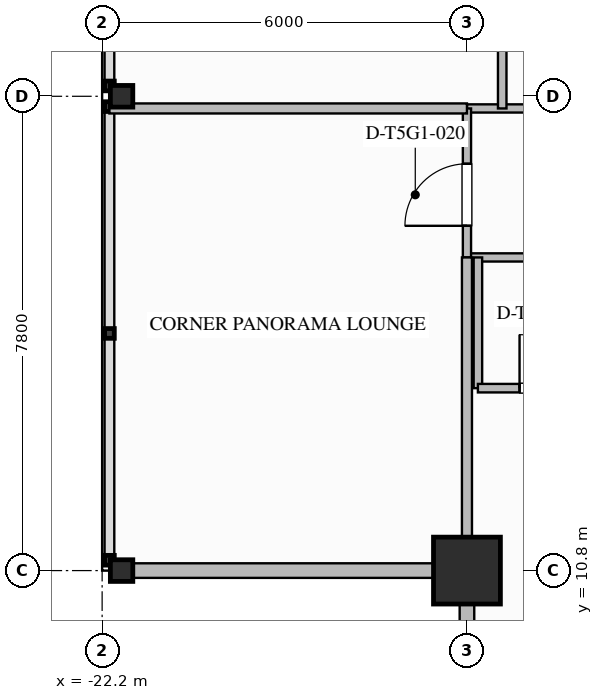
"""IFC4 building model, lengths in metres.
Left out: names, types, materials, properties, quantities, classifications, styles, units other than length and angle.
Written with IfcOpenShell. Run it as: python <this file> out.ifc"""

import sys

from ifc_helpers import new_model, si_unit, direction, frame, frame_2d, origin, origin_2d, place, context, subcontext, project, spatial, rectangle, i_section, extrude, element, fill, save


model = new_model("IFC4")
c1 = context("Model", 3, precision=1e-05, world=origin(), true_north=direction((0.0, 1.0)))
c2 = subcontext(c1, "Body", "Model", "MODEL_VIEW")
j1 = project(units=[si_unit("LENGTHUNIT", "METRE"), si_unit("PLANEANGLEUNIT", "RADIAN")], contexts=[c1])
p1 = place(None, origin())
s1 = spatial("IfcSite", under=j1, at=p1, CompositionType="ELEMENT")
p2 = place(p1, origin())
s2 = spatial("IfcBuilding", under=s1, at=p2, CompositionType="ELEMENT")
p3 = place(p2, frame((0.0, 0.0, 272.3)))
s3 = spatial("IfcBuildingStorey", under=s2, at=p3, CompositionType="ELEMENT", Elevation=272.3)
p4 = place(p3, frame((-16.2, 10.8, 0.0), z_axis=(0.0, 0.0, 1.0), x_axis=(1.0, 0.0, 0.0)))
e1 = element("IfcColumn", 1, at=p4, inside=s3, PredefinedType="COLUMN", context=c2, shape_type="SweptSolid", body=[
    extrude(rectangle(XDim=1.1, YDim=1.1, at=origin_2d()), origin(), (0.0, 0.0, 1.0), 3.65),
])
for number, where, z_axis, x_axis in (
    (2, (-21.88, 10.8, 0.0), (0.0, 0.0, 1.0), (1.0, 0.0, 0.0)),
    (3, (-21.88, 18.6, 0.0), (0.0, 0.0, 1.0), (1.0, 0.0, 0.0)),
):
    element("IfcColumn", number, at=place(p3, frame(where, z_axis=z_axis, x_axis=x_axis)), inside=s3, PredefinedType="COLUMN", context=c2, shape_type="SweptSolid", body=[
        extrude(i_section(OverallWidth=0.369, OverallDepth=0.356, WebThickness=0.011, FlangeThickness=0.018, FilletRadius=0.025, at=origin_2d()), origin(), (0.0, 0.0, 1.0), 3.647),
    ])
for number, where, z_axis, x_axis in (
    (4, (-16.2, 4.92, 0.0), (0.0, 0.0, 1.0), (0.0, 1.0, 0.0)),
    (5, (-16.2, 10.8, 0.0), (0.0, 0.0, 1.0), (-1.0, 0.0, 0.0)),
):
    element("IfcWall", number, at=place(p3, frame(where, z_axis=z_axis, x_axis=x_axis)), inside=s3, PredefinedType="STANDARD", context=c2, shape_type="SweptSolid", body=[
        extrude(rectangle(XDim=5.88, YDim=0.24, at=frame_2d((2.94, 0.0))), origin(), (0.0, 0.0, 1.0), 2.779),
    ])
p5 = place(p3, frame((-16.2, 15.95, 0.0), z_axis=(0.0, 0.0, 1.0), x_axis=(1.0, 0.0, 0.0)))
e6 = element("IfcWall", 6, at=p5, inside=s3, PredefinedType="PARTITIONING", context=c2, shape_type="SweptSolid", body=[
    extrude(rectangle(XDim=38.28, YDim=0.135, at=frame_2d((19.14, 0.0))), origin(), (0.0, 0.0, 1.0), 3.39),
])
p6 = place(p5, frame((35.785, 0.0, 0.0)))
e7 = element("IfcOpeningElement", 7, at=p6, cuts=e6, PredefinedType="OPENING", context=c2, shape_type="SweptSolid", body=[
    extrude(rectangle(XDim=1.26, YDim=2.2, at=frame_2d((0.63, 1.1))), frame((0.0, 0.077, 0.0), z_axis=(0.0, -1.0, 0.0), x_axis=(1.0, 0.0, 0.0)), (0.0, 0.0, 1.0), 0.155),
])
p7 = place(p5, frame((3.285, 0.0, 0.0)))
e8 = element("IfcOpeningElement", 8, at=p7, cuts=e6, PredefinedType="OPENING", context=c2, shape_type="SweptSolid", body=[
    extrude(rectangle(XDim=1.26, YDim=2.2, at=frame_2d((0.63, 1.1))), frame((0.0, 0.077, 0.0), z_axis=(0.0, -1.0, 0.0), x_axis=(1.0, 0.0, 0.0)), (0.0, 0.0, 1.0), 0.155),
])
p8 = place(p5, frame((7.335, 0.0, 0.0)))
e9 = element("IfcOpeningElement", 9, at=p8, cuts=e6, PredefinedType="OPENING", context=c2, shape_type="SweptSolid", body=[
    extrude(rectangle(XDim=1.26, YDim=2.2, at=frame_2d((0.63, 1.1))), frame((0.0, 0.077, 0.0), z_axis=(0.0, -1.0, 0.0), x_axis=(1.0, 0.0, 0.0)), (0.0, 0.0, 1.0), 0.155),
])
p9 = place(p5, frame((15.69, 0.0, 0.0)))
e10 = element("IfcOpeningElement", 10, at=p9, cuts=e6, PredefinedType="OPENING", context=c2, shape_type="SweptSolid", body=[
    extrude(rectangle(XDim=1.02, YDim=2.15, at=frame_2d((0.51, 1.075))), frame((0.0, 0.077, 0.0), z_axis=(0.0, -1.0, 0.0), x_axis=(1.0, 0.0, 0.0)), (0.0, 0.0, 1.0), 0.155),
])
p10 = place(p5, frame((21.375, 0.0, 0.0)))
e11 = element("IfcOpeningElement", 11, at=p10, cuts=e6, PredefinedType="OPENING", context=c2, shape_type="SweptSolid", body=[
    extrude(rectangle(XDim=1.26, YDim=2.2, at=frame_2d((0.63, 1.1))), frame((0.0, 0.077, 0.0), z_axis=(0.0, -1.0, 0.0), x_axis=(1.0, 0.0, 0.0)), (0.0, 0.0, 1.0), 0.155),
])
p11 = place(p5, frame((30.285, 0.0, 0.0)))
e12 = element("IfcOpeningElement", 12, at=p11, cuts=e6, PredefinedType="OPENING", context=c2, shape_type="SweptSolid", body=[
    extrude(rectangle(XDim=1.26, YDim=2.2, at=frame_2d((0.63, 1.1))), frame((0.0, 0.077, 0.0), z_axis=(0.0, -1.0, 0.0), x_axis=(1.0, 0.0, 0.0)), (0.0, 0.0, 1.0), 0.155),
])
p12 = place(p3, frame((-16.2, 18.4, 0.0), z_axis=(0.0, 0.0, 1.0), x_axis=(1.0, 0.0, 0.0)))
e13 = element("IfcWall", 13, at=p12, inside=s3, PredefinedType="PARTITIONING", context=c2, shape_type="SweptSolid", body=[
    extrude(rectangle(XDim=7.6, YDim=0.135, at=frame_2d((3.8, 0.0))), origin(), (0.0, 0.0, 1.0), 2.767),
])
p13 = place(p12, frame((4.585, 0.0, 0.0)))
e14 = element("IfcOpeningElement", 14, at=p13, cuts=e13, PredefinedType="OPENING", context=c2, shape_type="SweptSolid", body=[
    extrude(rectangle(XDim=1.26, YDim=2.2, at=frame_2d((0.63, 1.1))), frame((0.0, 0.077, 0.0), z_axis=(0.0, -1.0, 0.0), x_axis=(1.0, 0.0, 0.0)), (0.0, 0.0, 1.0), 0.155),
])
p14 = place(p3, frame((-16.2, 15.95, 0.0), z_axis=(0.0, 0.0, 1.0), x_axis=(0.0, 1.0, 0.0)))
e15 = element("IfcWall", 15, at=p14, inside=s3, PredefinedType="PARTITIONING", context=c2, shape_type="SweptSolid", body=[
    extrude(rectangle(XDim=2.45, YDim=0.135, at=frame_2d((1.225, 0.0))), origin(), (0.0, 0.0, 1.0), 2.764),
])
p15 = place(p14, frame((0.52, 0.0, 0.0)))
e16 = element("IfcOpeningElement", 16, at=p15, cuts=e15, PredefinedType="OPENING", context=c2, shape_type="SweptSolid", body=[
    extrude(rectangle(XDim=1.02, YDim=2.15, at=frame_2d((0.51, 1.075))), frame((0.0, 0.077, 0.0), z_axis=(0.0, -1.0, 0.0), x_axis=(1.0, 0.0, 0.0)), (0.0, 0.0, 1.0), 0.155),
])
p16 = place(p3, frame((-16.2, 10.92, 0.0), z_axis=(0.0, 0.0, 1.0), x_axis=(0.0, 1.0, 0.0)))
e17 = element("IfcWall", 17, at=p16, inside=s3, PredefinedType="PARTITIONING", context=c2, shape_type="SweptSolid", body=[
    extrude(rectangle(XDim=5.03, YDim=0.165, at=frame_2d((2.515, 0.0))), origin(), (0.0, 0.0, 1.0), 2.764),
])
p17 = place(p3, frame((-22.08, 18.4, 0.0), z_axis=(0.0, 0.0, 1.0), x_axis=(1.0, 0.0, 0.0)))
e18 = element("IfcWall", 18, at=p17, inside=s3, PredefinedType="PARTITIONING", context=c2, shape_type="SweptSolid", body=[
    extrude(rectangle(XDim=5.88, YDim=0.165, at=frame_2d((2.94, 0.0))), origin(), (0.0, 0.0, 1.0), 2.764),
])
p18 = place(p3, frame((-16.02, 15.95, 0.0), z_axis=(0.0, 0.0, 1.0), x_axis=(0.0, -1.0, 0.0)))
e19 = element("IfcWall", 19, at=p18, inside=s3, PredefinedType="PLUMBINGWALL", context=c2, shape_type="SweptSolid", body=[
    extrude(rectangle(XDim=2.15, YDim=0.14, at=frame_2d((1.075, 0.0))), origin(), (0.0, 0.0, 1.0), 2.764),
])
p19 = place(p3, frame((-16.02, 13.8, 0.0), z_axis=(0.0, 0.0, 1.0), x_axis=(1.0, 0.0, 0.0)))
e20 = element("IfcWall", 20, at=p19, inside=s3, PredefinedType="PLUMBINGWALL", context=c2, shape_type="SweptSolid", body=[
    extrude(rectangle(XDim=2.25, YDim=0.14, at=frame_2d((1.125, 0.0))), origin(), (0.0, 0.0, 1.0), 3.39),
])
p20 = place(p19, frame((0.685, 0.0, 0.0)))
e21 = element("IfcOpeningElement", 21, at=p20, cuts=e20, PredefinedType="OPENING", context=c2, shape_type="SweptSolid", body=[
    extrude(rectangle(XDim=0.88, YDim=2.1, at=frame_2d((0.44, 1.05))), frame((0.0, 0.08, 0.0), z_axis=(0.0, -1.0, 0.0), x_axis=(1.0, 0.0, 0.0)), (0.0, 0.0, 1.0), 0.16),
])
p21 = place(p3, frame((-15.62, 18.4, 0.0), z_axis=(0.0, 0.0, 1.0), x_axis=(0.0, 1.0, 0.0)))
e22 = element("IfcWall", 22, at=p21, inside=s3, PredefinedType="PLUMBINGWALL", context=c2, shape_type="SweptSolid", body=[
    extrude(rectangle(XDim=2.15, YDim=0.14, at=frame_2d((1.075, 0.0))), origin(), (0.0, 0.0, 1.0), 3.39),
])
p22 = place(p15, origin())
e23 = element("IfcDoor", 23, at=p22, inside=s3, OperationType="SINGLE_SWING_LEFT", PredefinedType="DOOR", context=c2, shape_type="SweptSolid", body=[
    extrude(rectangle(XDim=1.02, YDim=2.15, at=frame_2d((0.51, 1.075))), frame((0.0, 0.025, 0.0), z_axis=(0.0, -1.0, 0.0), x_axis=(1.0, 0.0, 0.0)), (0.0, 0.0, 1.0), 0.05),
])
fill(e16, e23)
p23 = place(p20, origin())
e24 = element("IfcDoor", 24, at=p23, inside=s3, OperationType="SINGLE_SWING_LEFT", PredefinedType="DOOR", context=c2, shape_type="SweptSolid", body=[
    extrude(rectangle(XDim=0.88, YDim=2.1, at=frame_2d((0.44, 1.05))), frame((0.0, 0.025, 0.0), z_axis=(0.0, -1.0, 0.0), x_axis=(1.0, 0.0, 0.0)), (0.0, 0.0, 1.0), 0.05),
])
fill(e21, e24)
save(model, sys.argv[1])
